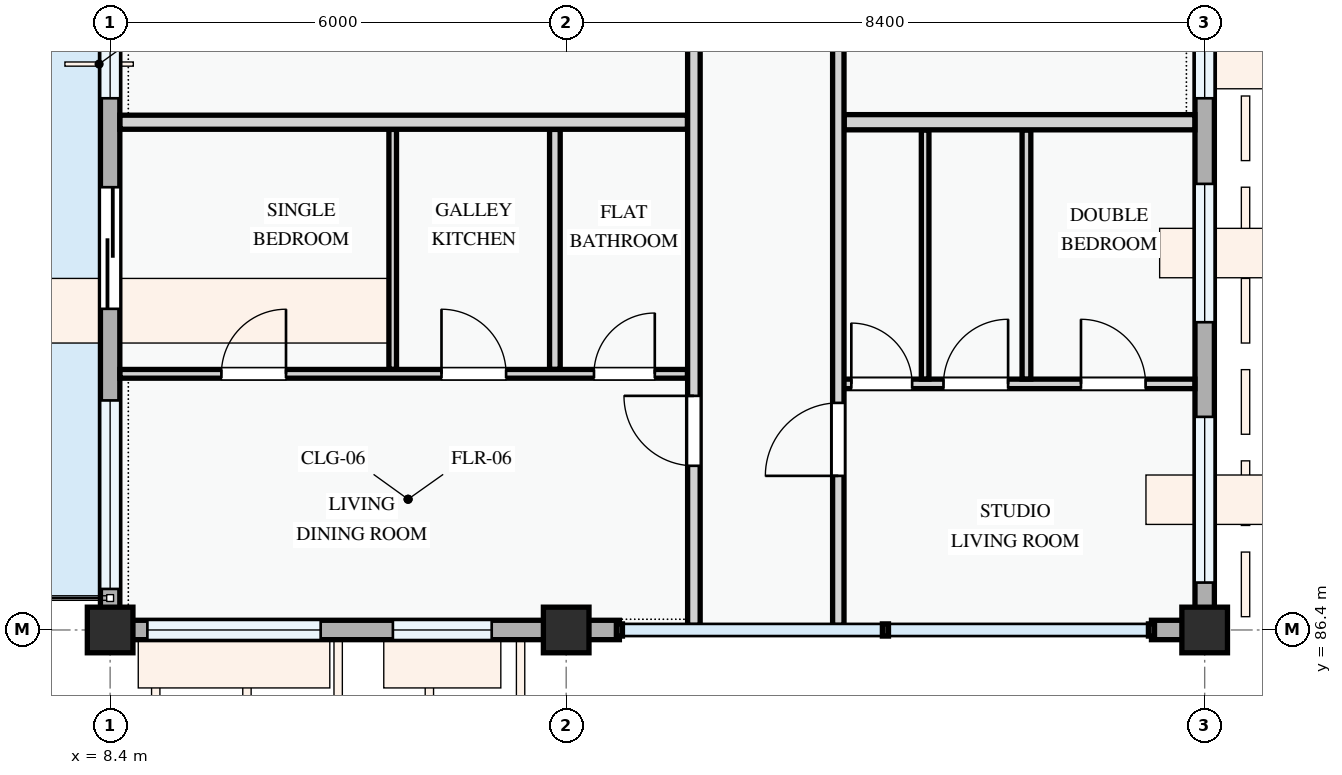
"""IFC4 building model, lengths in metres.
Left out: names, types, materials, properties, quantities, classifications, styles, units other than length and angle.
Written with IfcOpenShell. Run it as: python <this file> out.ifc"""

import sys

from ifc_helpers import new_model, si_unit, direction, frame, frame_2d, origin, origin_2d, place, context, subcontext, project, spatial, rectangle, extrude, element, fill, save


model = new_model("IFC4")
c1 = context("Model", 3, precision=1e-05, world=origin(), true_north=direction((0.0, 1.0)))
c2 = subcontext(c1, "Body", "Model", "MODEL_VIEW")
j1 = project(units=[si_unit("LENGTHUNIT", "METRE"), si_unit("PLANEANGLEUNIT", "RADIAN")], contexts=[c1])
p1 = place(None, origin())
s1 = spatial("IfcSite", under=j1, at=p1, CompositionType="ELEMENT")
p2 = place(p1, origin())
s2 = spatial("IfcBuilding", under=s1, at=p2, CompositionType="ELEMENT")
p3 = place(p2, frame((0.0, 0.0, 37.8)))
s3 = spatial("IfcBuildingStorey", under=s2, at=p3, CompositionType="ELEMENT", Elevation=37.8)
for number, where, z_axis, x_axis in (
    (1, (8.4, 86.4, 0.0), (0.0, 0.0, 1.0), (1.0, 0.0, 0.0)),
    (2, (14.4, 86.4, 0.0), (0.0, 0.0, 1.0), (1.0, 0.0, 0.0)),
    (3, (22.8, 86.4, 0.0), (0.0, 0.0, 1.0), (1.0, 0.0, 0.0)),
):
    element("IfcColumn", number, at=place(p3, frame(where, z_axis=z_axis, x_axis=x_axis)), inside=s3, PredefinedType="COLUMN", context=c2, shape_type="SweptSolid", body=[
        extrude(rectangle(XDim=0.6, YDim=0.6, at=origin_2d()), origin(), (0.0, 0.0, 1.0), 3.3),
    ])
p4 = place(p3, frame((8.4, 94.8, 0.0), z_axis=(0.0, 0.0, 1.0), x_axis=(0.0, -1.0, 0.0)))
e4 = element("IfcWall", 4, at=p4, inside=s3, PredefinedType="STANDARD", context=c2, shape_type="SweptSolid", body=[
    extrude(rectangle(XDim=8.4, YDim=0.255, at=frame_2d((4.2, 0.0))), origin(), (0.0, 0.0, 1.0), 2.425),
])
p5 = place(p4, frame((2.575, 0.0, 0.0)))
e5 = element("IfcOpeningElement", 5, at=p5, cuts=e4, PredefinedType="OPENING", context=c2, shape_type="SweptSolid", body=[
    extrude(rectangle(XDim=1.6, YDim=2.2, at=frame_2d((0.8, 1.1))), frame((0.0, 0.137, 0.0), z_axis=(0.0, -1.0, 0.0), x_axis=(1.0, 0.0, 0.0)), (0.0, 0.0, 1.0), 0.275),
])
p6 = place(p4, frame((0.505, 0.0, 0.78)))
e6 = element("IfcOpeningElement", 6, at=p6, cuts=e4, PredefinedType="OPENING", context=c2, shape_type="SweptSolid", body=[
    extrude(rectangle(XDim=0.9, YDim=1.2, at=frame_2d((0.45, 0.6))), frame((0.0, 0.137, 0.0), z_axis=(0.0, -1.0, 0.0), x_axis=(1.0, 0.0, 0.0)), (0.0, 0.0, 1.0), 0.275),
])
p7 = place(p4, frame((5.38, 0.0, 0.78)))
e7 = element("IfcOpeningElement", 7, at=p7, cuts=e4, PredefinedType="OPENING", context=c2, shape_type="SweptSolid", body=[
    extrude(rectangle(XDim=2.48, YDim=1.46, at=frame_2d((1.24, 0.73))), frame((0.0, 0.137, 0.0), z_axis=(0.0, -1.0, 0.0), x_axis=(1.0, 0.0, 0.0)), (0.0, 0.0, 1.0), 0.275),
])
p8 = place(p3, frame((8.4, 86.4, 0.0), z_axis=(0.0, 0.0, 1.0), x_axis=(1.0, 0.0, 0.0)))
e8 = element("IfcWall", 8, at=p8, inside=s3, PredefinedType="STANDARD", context=c2, shape_type="SweptSolid", body=[
    extrude(rectangle(XDim=6.0, YDim=0.255, at=frame_2d((3.0, 0.0))), origin(), (0.0, 0.0, 1.0), 2.525),
])
p9 = place(p8, frame((0.49, 0.0, 0.78)))
e9 = element("IfcOpeningElement", 9, at=p9, cuts=e8, PredefinedType="OPENING", context=c2, shape_type="SweptSolid", body=[
    extrude(rectangle(XDim=2.28, YDim=1.46, at=frame_2d((1.14, 0.73))), frame((0.0, 0.137, 0.0), z_axis=(0.0, -1.0, 0.0), x_axis=(1.0, 0.0, 0.0)), (0.0, 0.0, 1.0), 0.275),
])
p10 = place(p8, frame((3.72, 0.0, 0.78)))
e10 = element("IfcOpeningElement", 10, at=p10, cuts=e8, PredefinedType="OPENING", context=c2, shape_type="SweptSolid", body=[
    extrude(rectangle(XDim=1.3, YDim=1.4, at=frame_2d((0.65, 0.7))), frame((0.0, 0.137, 0.0), z_axis=(0.0, -1.0, 0.0), x_axis=(1.0, 0.0, 0.0)), (0.0, 0.0, 1.0), 0.275),
])
p11 = place(p3, frame((14.4, 86.4, 0.0), z_axis=(0.0, 0.0, 1.0), x_axis=(1.0, 0.0, 0.0)))
e11 = element("IfcWall", 11, at=p11, inside=s3, PredefinedType="STANDARD", context=c2, shape_type="SweptSolid", body=[
    extrude(rectangle(XDim=0.7, YDim=0.255, at=frame_2d((0.35, 0.0))), origin(), (0.0, 0.0, 1.0), 2.375),
])
p12 = place(p3, frame((22.1, 86.4, 0.0), z_axis=(0.0, 0.0, 1.0), x_axis=(1.0, 0.0, 0.0)))
e12 = element("IfcWall", 12, at=p12, inside=s3, PredefinedType="STANDARD", context=c2, shape_type="SweptSolid", body=[
    extrude(rectangle(XDim=0.57, YDim=0.255, at=frame_2d((0.285, 0.0))), origin(), (0.0, 0.0, 1.0), 2.375),
])
p13 = place(p3, frame((22.8, 86.4, 0.0), z_axis=(0.0, 0.0, 1.0), x_axis=(0.0, 1.0, 0.0)))
e13 = element("IfcWall", 13, at=p13, inside=s3, PredefinedType="STANDARD", context=c2, shape_type="SweptSolid", body=[
    extrude(rectangle(XDim=8.4, YDim=0.255, at=frame_2d((4.2, 0.0))), origin(), (0.0, 0.0, 1.0), 2.425),
])
p14 = place(p13, frame((0.624, 0.0, 0.78)))
e14 = element("IfcOpeningElement", 14, at=p14, cuts=e13, PredefinedType="OPENING", context=c2, shape_type="SweptSolid", body=[
    extrude(rectangle(XDim=2.18, YDim=1.48, at=frame_2d((1.09, 0.74))), frame((0.0, 0.137, 0.0), z_axis=(0.0, -1.0, 0.0), x_axis=(1.0, 0.0, 0.0)), (0.0, 0.0, 1.0), 0.275),
])
p15 = place(p13, frame((4.049, 0.0, 0.78)))
e15 = element("IfcOpeningElement", 15, at=p15, cuts=e13, PredefinedType="OPENING", context=c2, shape_type="SweptSolid", body=[
    extrude(rectangle(XDim=1.82, YDim=1.46, at=frame_2d((0.91, 0.73))), frame((0.0, 0.137, 0.0), z_axis=(0.0, -1.0, 0.0), x_axis=(1.0, 0.0, 0.0)), (0.0, 0.0, 1.0), 0.275),
])
p16 = place(p13, frame((6.995, 0.0, 0.78)))
e16 = element("IfcOpeningElement", 16, at=p16, cuts=e13, PredefinedType="OPENING", context=c2, shape_type="SweptSolid", body=[
    extrude(rectangle(XDim=0.9, YDim=1.2, at=frame_2d((0.45, 0.6))), frame((0.0, 0.137, 0.0), z_axis=(0.0, -1.0, 0.0), x_axis=(1.0, 0.0, 0.0)), (0.0, 0.0, 1.0), 0.275),
])
p17 = place(p3, frame((8.53, 89.77, 0.0), z_axis=(0.0, 0.0, 1.0), x_axis=(1.0, 0.0, 0.0)))
e17 = element("IfcWall", 17, at=p17, inside=s3, PredefinedType="PARTITIONING", context=c2, shape_type="SweptSolid", body=[
    extrude(rectangle(XDim=7.466, YDim=0.115, at=frame_2d((3.733, 0.0))), origin(), (0.0, 0.0, 1.0), 3.0),
])
p18 = place(p17, frame((1.334, 0.0, 0.0)))
e18 = element("IfcOpeningElement", 18, at=p18, cuts=e17, PredefinedType="OPENING", context=c2, shape_type="SweptSolid", body=[
    extrude(rectangle(XDim=0.85, YDim=2.1, at=frame_2d((0.425, 1.05))), frame((0.0, 0.067, 0.0), z_axis=(0.0, -1.0, 0.0), x_axis=(1.0, 0.0, 0.0)), (0.0, 0.0, 1.0), 0.135),
])
p19 = place(p17, frame((4.23, 0.0, 0.0)))
e19 = element("IfcOpeningElement", 19, at=p19, cuts=e17, PredefinedType="OPENING", context=c2, shape_type="SweptSolid", body=[
    extrude(rectangle(XDim=0.85, YDim=2.1, at=frame_2d((0.425, 1.05))), frame((0.0, 0.067, 0.0), z_axis=(0.0, -1.0, 0.0), x_axis=(1.0, 0.0, 0.0)), (0.0, 0.0, 1.0), 0.135),
])
p20 = place(p17, frame((6.236, 0.0, 0.0)))
e20 = element("IfcOpeningElement", 20, at=p20, cuts=e17, PredefinedType="OPENING", context=c2, shape_type="SweptSolid", body=[
    extrude(rectangle(XDim=0.8, YDim=2.1, at=frame_2d((0.4, 1.05))), frame((0.0, 0.067, 0.0), z_axis=(0.0, -1.0, 0.0), x_axis=(1.0, 0.0, 0.0)), (0.0, 0.0, 1.0), 0.135),
])
p21 = place(p3, frame((12.118, 89.83, 0.0), z_axis=(0.0, 0.0, 1.0), x_axis=(0.0, 1.0, 0.0)))
e21 = element("IfcWall", 21, at=p21, inside=s3, PredefinedType="PARTITIONING", context=c2, shape_type="SweptSolid", body=[
    extrude(rectangle(XDim=3.156, YDim=0.1, at=frame_2d((1.578, 0.0))), origin(), (0.0, 0.0, 1.0), 3.0),
])
p22 = place(p3, frame((14.251, 89.83, 0.0), z_axis=(0.0, 0.0, 1.0), x_axis=(0.0, 1.0, 0.0)))
e22 = element("IfcWall", 22, at=p22, inside=s3, PredefinedType="PARTITIONING", context=c2, shape_type="SweptSolid", body=[
    extrude(rectangle(XDim=3.156, YDim=0.14, at=frame_2d((1.578, 0.0))), origin(), (0.0, 0.0, 1.0), 2.425),
])
p23 = place(p3, frame((17.98, 89.638, 0.0), z_axis=(0.0, 0.0, 1.0), x_axis=(1.0, 0.0, 0.0)))
e23 = element("IfcWall", 23, at=p23, inside=s3, PredefinedType="PARTITIONING", context=c2, shape_type="SweptSolid", body=[
    extrude(rectangle(XDim=4.69, YDim=0.125, at=frame_2d((2.345, 0.0))), origin(), (0.0, 0.0, 1.0), 3.0),
])
p24 = place(p23, frame((0.171, 0.0, 0.0)))
e24 = element("IfcOpeningElement", 24, at=p24, cuts=e23, PredefinedType="OPENING", context=c2, shape_type="SweptSolid", body=[
    extrude(rectangle(XDim=0.8, YDim=2.1, at=frame_2d((0.4, 1.05))), frame((0.0, 0.073, 0.0), z_axis=(0.0, -1.0, 0.0), x_axis=(1.0, 0.0, 0.0)), (0.0, 0.0, 1.0), 0.145),
])
p25 = place(p23, frame((1.384, 0.0, 0.0)))
e25 = element("IfcOpeningElement", 25, at=p25, cuts=e23, PredefinedType="OPENING", context=c2, shape_type="SweptSolid", body=[
    extrude(rectangle(XDim=0.85, YDim=2.1, at=frame_2d((0.425, 1.05))), frame((0.0, 0.073, 0.0), z_axis=(0.0, -1.0, 0.0), x_axis=(1.0, 0.0, 0.0)), (0.0, 0.0, 1.0), 0.145),
])
p26 = place(p23, frame((3.193, 0.0, 0.0)))
e26 = element("IfcOpeningElement", 26, at=p26, cuts=e23, PredefinedType="OPENING", context=c2, shape_type="SweptSolid", body=[
    extrude(rectangle(XDim=0.85, YDim=2.1, at=frame_2d((0.425, 1.05))), frame((0.0, 0.073, 0.0), z_axis=(0.0, -1.0, 0.0), x_axis=(1.0, 0.0, 0.0)), (0.0, 0.0, 1.0), 0.145),
])
p27 = place(p3, frame((20.455, 89.702, 0.0), z_axis=(0.0, 0.0, 1.0), x_axis=(0.0, 1.0, 0.0)))
e27 = element("IfcWall", 27, at=p27, inside=s3, PredefinedType="PARTITIONING", context=c2, shape_type="SweptSolid", body=[
    extrude(rectangle(XDim=3.276, YDim=0.115, at=frame_2d((1.638, 0.0))), origin(), (0.0, 0.0, 1.0), 3.0),
])
p28 = place(p3, frame((19.122, 89.702, 0.0), z_axis=(0.0, 0.0, 1.0), x_axis=(0.0, 1.0, 0.0)))
e28 = element("IfcWall", 28, at=p28, inside=s3, PredefinedType="PARTITIONING", context=c2, shape_type="SweptSolid", body=[
    extrude(rectangle(XDim=3.276, YDim=0.1, at=frame_2d((1.638, 0.0))), origin(), (0.0, 0.0, 1.0), 3.0),
])
p29 = place(p3, frame((8.53, 93.08, 0.0), z_axis=(0.0, 0.0, 1.0), x_axis=(1.0, 0.0, 0.0)))
e29 = element("IfcWall", 29, at=p29, inside=s3, PredefinedType="PARTITIONING", context=c2, shape_type="SweptSolid", body=[
    extrude(rectangle(XDim=7.466, YDim=0.185, at=frame_2d((3.733, 0.0))), origin(), (0.0, 0.0, 1.0), 3.0),
])
p30 = place(p3, frame((18.057, 93.08, 0.0), z_axis=(0.0, 0.0, 1.0), x_axis=(1.0, 0.0, 0.0)))
e30 = element("IfcWall", 30, at=p30, inside=s3, PredefinedType="PARTITIONING", context=c2, shape_type="SweptSolid", body=[
    extrude(rectangle(XDim=4.614, YDim=0.2, at=frame_2d((2.307, 0.0))), origin(), (0.0, 0.0, 1.0), 3.0),
])
p31 = place(p3, frame((16.08, 86.46, 0.0), z_axis=(0.0, 0.0, 1.0), x_axis=(0.0, 1.0, 0.0)))
e31 = element("IfcWall", 31, at=p31, inside=s3, PredefinedType="PARTITIONING", context=c2, shape_type="SweptSolid", body=[
    extrude(rectangle(XDim=22.88, YDim=0.165, at=frame_2d((11.44, 0.0))), origin(), (0.0, 0.0, 1.0), 3.0),
])
p32 = place(p31, frame((2.1, 0.0, 0.0)))
e32 = element("IfcOpeningElement", 32, at=p32, cuts=e31, PredefinedType="OPENING", context=c2, shape_type="SweptSolid", body=[
    extrude(rectangle(XDim=0.92, YDim=2.1, at=frame_2d((0.46, 1.05))), frame((0.0, 0.093, 0.0), z_axis=(0.0, -1.0, 0.0), x_axis=(1.0, 0.0, 0.0)), (0.0, 0.0, 1.0), 0.185),
])
p33 = place(p31, frame((10.135, 0.0, 0.0)))
e33 = element("IfcOpeningElement", 33, at=p33, cuts=e31, PredefinedType="OPENING", context=c2, shape_type="SweptSolid", body=[
    extrude(rectangle(XDim=0.92, YDim=2.1, at=frame_2d((0.46, 1.05))), frame((0.0, 0.093, 0.0), z_axis=(0.0, -1.0, 0.0), x_axis=(1.0, 0.0, 0.0)), (0.0, 0.0, 1.0), 0.185),
])
p34 = place(p31, frame((18.083, 0.0, 0.0)))
e34 = element("IfcOpeningElement", 34, at=p34, cuts=e31, PredefinedType="OPENING", context=c2, shape_type="SweptSolid", body=[
    extrude(rectangle(XDim=0.92, YDim=2.1, at=frame_2d((0.46, 1.05))), frame((0.0, 0.093, 0.0), z_axis=(0.0, -1.0, 0.0), x_axis=(1.0, 0.0, 0.0)), (0.0, 0.0, 1.0), 0.185),
])
p35 = place(p3, frame((17.98, 86.46, 0.0), z_axis=(0.0, 0.0, 1.0), x_axis=(0.0, 1.0, 0.0)))
e35 = element("IfcWall", 35, at=p35, inside=s3, PredefinedType="PARTITIONING", context=c2, shape_type="SweptSolid", body=[
    extrude(rectangle(XDim=22.88, YDim=0.15, at=frame_2d((11.44, 0.0))), origin(), (0.0, 0.0, 1.0), 3.0),
])
p36 = place(p35, frame((1.968, 0.0, 0.0)))
e36 = element("IfcOpeningElement", 36, at=p36, cuts=e35, PredefinedType="OPENING", context=c2, shape_type="SweptSolid", body=[
    extrude(rectangle(XDim=0.96, YDim=2.12, at=frame_2d((0.48, 1.06))), frame((0.0, 0.085, 0.0), z_axis=(0.0, -1.0, 0.0), x_axis=(1.0, 0.0, 0.0)), (0.0, 0.0, 1.0), 0.17),
])
p37 = place(p35, frame((9.946, 0.0, 0.0)))
e37 = element("IfcOpeningElement", 37, at=p37, cuts=e35, PredefinedType="OPENING", context=c2, shape_type="SweptSolid", body=[
    extrude(rectangle(XDim=0.92, YDim=2.1, at=frame_2d((0.46, 1.05))), frame((0.0, 0.085, 0.0), z_axis=(0.0, -1.0, 0.0), x_axis=(1.0, 0.0, 0.0)), (0.0, 0.0, 1.0), 0.17),
])
p38 = place(p35, frame((18.072, 0.0, 0.0)))
e38 = element("IfcOpeningElement", 38, at=p38, cuts=e35, PredefinedType="OPENING", context=c2, shape_type="SweptSolid", body=[
    extrude(rectangle(XDim=0.92, YDim=2.1, at=frame_2d((0.46, 1.05))), frame((0.0, 0.085, 0.0), z_axis=(0.0, -1.0, 0.0), x_axis=(1.0, 0.0, 0.0)), (0.0, 0.0, 1.0), 0.17),
])
p39 = place(p5, frame((1.6, 0.0, 0.0), z_axis=(0.0, 0.0, 1.0), x_axis=(-1.0, 0.0, 0.0)))
e39 = element("IfcDoor", 39, at=p39, inside=s3, OperationType="SLIDING_TO_LEFT", PredefinedType="DOOR", context=c2, shape_type="SweptSolid", body=[
    extrude(rectangle(XDim=1.6, YDim=2.2, at=frame_2d((0.8, 1.1))), frame((0.0, 0.025, 0.0), z_axis=(0.0, -1.0, 0.0), x_axis=(1.0, 0.0, 0.0)), (0.0, 0.0, 1.0), 0.05),
])
fill(e5, e39)
p40 = place(p6, origin())
e40 = element("IfcWindow", 40, at=p40, inside=s3, PartitioningType="SINGLE_PANEL", PredefinedType="WINDOW", context=c2, shape_type="SweptSolid", body=[
    extrude(rectangle(XDim=0.9, YDim=1.2, at=frame_2d((0.45, 0.6))), frame((0.0, 0.03, 0.0), z_axis=(0.0, -1.0, 0.0), x_axis=(1.0, 0.0, 0.0)), (0.0, 0.0, 1.0), 0.06),
])
fill(e6, e40)
p41 = place(p7, origin())
e41 = element("IfcWindow", 41, at=p41, inside=s3, PartitioningType="DOUBLE_PANEL_VERTICAL", PredefinedType="WINDOW", context=c2, shape_type="SweptSolid", body=[
    extrude(rectangle(XDim=2.48, YDim=1.46, at=frame_2d((1.24, 0.73))), frame((0.0, 0.03, 0.0), z_axis=(0.0, -1.0, 0.0), x_axis=(1.0, 0.0, 0.0)), (0.0, 0.0, 1.0), 0.06),
])
fill(e7, e41)
p42 = place(p9, origin())
e42 = element("IfcWindow", 42, at=p42, inside=s3, PartitioningType="DOUBLE_PANEL_VERTICAL", PredefinedType="WINDOW", context=c2, shape_type="SweptSolid", body=[
    extrude(rectangle(XDim=2.28, YDim=1.46, at=frame_2d((1.14, 0.73))), frame((0.0, 0.03, 0.0), z_axis=(0.0, -1.0, 0.0), x_axis=(1.0, 0.0, 0.0)), (0.0, 0.0, 1.0), 0.06),
])
fill(e9, e42)
p43 = place(p10, origin())
e43 = element("IfcWindow", 43, at=p43, inside=s3, PartitioningType="SINGLE_PANEL", PredefinedType="WINDOW", context=c2, shape_type="SweptSolid", body=[
    extrude(rectangle(XDim=1.3, YDim=1.4, at=frame_2d((0.65, 0.7))), frame((0.0, 0.03, 0.0), z_axis=(0.0, -1.0, 0.0), x_axis=(1.0, 0.0, 0.0)), (0.0, 0.0, 1.0), 0.06),
])
fill(e10, e43)
p44 = place(p14, origin())
e44 = element("IfcWindow", 44, at=p44, inside=s3, PartitioningType="DOUBLE_PANEL_VERTICAL", PredefinedType="WINDOW", context=c2, shape_type="SweptSolid", body=[
    extrude(rectangle(XDim=2.18, YDim=1.48, at=frame_2d((1.09, 0.74))), frame((0.0, 0.03, 0.0), z_axis=(0.0, -1.0, 0.0), x_axis=(1.0, 0.0, 0.0)), (0.0, 0.0, 1.0), 0.06),
])
fill(e14, e44)
p45 = place(p15, origin())
e45 = element("IfcWindow", 45, at=p45, inside=s3, PartitioningType="DOUBLE_PANEL_VERTICAL", PredefinedType="WINDOW", context=c2, shape_type="SweptSolid", body=[
    extrude(rectangle(XDim=1.82, YDim=1.46, at=frame_2d((0.91, 0.73))), frame((0.0, 0.03, 0.0), z_axis=(0.0, -1.0, 0.0), x_axis=(1.0, 0.0, 0.0)), (0.0, 0.0, 1.0), 0.06),
])
fill(e15, e45)
p46 = place(p16, origin())
e46 = element("IfcWindow", 46, at=p46, inside=s3, PartitioningType="SINGLE_PANEL", PredefinedType="WINDOW", context=c2, shape_type="SweptSolid", body=[
    extrude(rectangle(XDim=0.9, YDim=1.2, at=frame_2d((0.45, 0.6))), frame((0.0, 0.03, 0.0), z_axis=(0.0, -1.0, 0.0), x_axis=(1.0, 0.0, 0.0)), (0.0, 0.0, 1.0), 0.06),
])
fill(e16, e46)
p47 = place(p18, origin())
e47 = element("IfcDoor", 47, at=p47, inside=s3, OperationType="SINGLE_SWING_RIGHT", PredefinedType="DOOR", context=c2, shape_type="SweptSolid", body=[
    extrude(rectangle(XDim=0.85, YDim=2.1, at=frame_2d((0.425, 1.05))), frame((0.0, 0.025, 0.0), z_axis=(0.0, -1.0, 0.0), x_axis=(1.0, 0.0, 0.0)), (0.0, 0.0, 1.0), 0.05),
])
fill(e18, e47)
p48 = place(p19, origin())
e48 = element("IfcDoor", 48, at=p48, inside=s3, OperationType="SINGLE_SWING_LEFT", PredefinedType="DOOR", context=c2, shape_type="SweptSolid", body=[
    extrude(rectangle(XDim=0.85, YDim=2.1, at=frame_2d((0.425, 1.05))), frame((0.0, 0.025, 0.0), z_axis=(0.0, -1.0, 0.0), x_axis=(1.0, 0.0, 0.0)), (0.0, 0.0, 1.0), 0.05),
])
fill(e19, e48)
p49 = place(p20, origin())
e49 = element("IfcDoor", 49, at=p49, inside=s3, OperationType="SINGLE_SWING_RIGHT", PredefinedType="DOOR", context=c2, shape_type="SweptSolid", body=[
    extrude(rectangle(XDim=0.8, YDim=2.1, at=frame_2d((0.4, 1.05))), frame((0.0, 0.025, 0.0), z_axis=(0.0, -1.0, 0.0), x_axis=(1.0, 0.0, 0.0)), (0.0, 0.0, 1.0), 0.05),
])
fill(e20, e49)
p50 = place(p24, origin())
e50 = element("IfcDoor", 50, at=p50, inside=s3, OperationType="SINGLE_SWING_LEFT", PredefinedType="DOOR", context=c2, shape_type="SweptSolid", body=[
    extrude(rectangle(XDim=0.8, YDim=2.1, at=frame_2d((0.4, 1.05))), frame((0.0, 0.025, 0.0), z_axis=(0.0, -1.0, 0.0), x_axis=(1.0, 0.0, 0.0)), (0.0, 0.0, 1.0), 0.05),
])
fill(e24, e50)
p51 = place(p25, origin())
e51 = element("IfcDoor", 51, at=p51, inside=s3, OperationType="SINGLE_SWING_RIGHT", PredefinedType="DOOR", context=c2, shape_type="SweptSolid", body=[
    extrude(rectangle(XDim=0.85, YDim=2.1, at=frame_2d((0.425, 1.05))), frame((0.0, 0.025, 0.0), z_axis=(0.0, -1.0, 0.0), x_axis=(1.0, 0.0, 0.0)), (0.0, 0.0, 1.0), 0.05),
])
fill(e25, e51)
p52 = place(p26, origin())
e52 = element("IfcDoor", 52, at=p52, inside=s3, OperationType="SINGLE_SWING_LEFT", PredefinedType="DOOR", context=c2, shape_type="SweptSolid", body=[
    extrude(rectangle(XDim=0.85, YDim=2.1, at=frame_2d((0.425, 1.05))), frame((0.0, 0.025, 0.0), z_axis=(0.0, -1.0, 0.0), x_axis=(1.0, 0.0, 0.0)), (0.0, 0.0, 1.0), 0.05),
])
fill(e26, e52)
p53 = place(p32, origin())
e53 = element("IfcDoor", 53, at=p53, inside=s3, OperationType="SINGLE_SWING_RIGHT", PredefinedType="DOOR", context=c2, shape_type="SweptSolid", body=[
    extrude(rectangle(XDim=0.92, YDim=2.1, at=frame_2d((0.46, 1.05))), frame((0.0, 0.025, 0.0), z_axis=(0.0, -1.0, 0.0), x_axis=(1.0, 0.0, 0.0)), (0.0, 0.0, 1.0), 0.05),
])
fill(e32, e53)
p54 = place(p36, origin())
e54 = element("IfcDoor", 54, at=p54, inside=s3, OperationType="SINGLE_SWING_LEFT", PredefinedType="DOOR", context=c2, shape_type="SweptSolid", body=[
    extrude(rectangle(XDim=0.96, YDim=2.12, at=frame_2d((0.48, 1.06))), frame((0.0, 0.025, 0.0), z_axis=(0.0, -1.0, 0.0), x_axis=(1.0, 0.0, 0.0)), (0.0, 0.0, 1.0), 0.05),
])
fill(e36, e54)
save(model, sys.argv[1])
